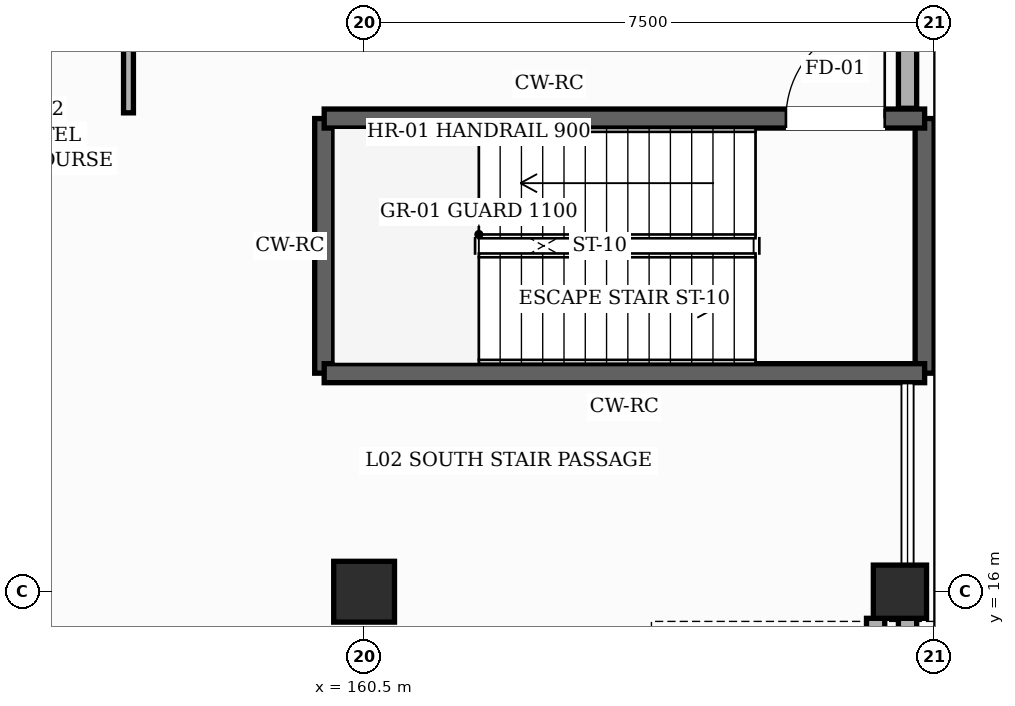
"""IFC4 building model, lengths in metres.
Left out: names, types, materials, properties, quantities, classifications, styles, units other than length and angle.
Written with IfcOpenShell. Run it as: python <this file> out.ifc"""

import sys

from ifc_helpers import new_model, si_unit, direction, frame, frame_2d, origin, origin_2d, place, context, subcontext, project, spatial, rectangle, hollow_rectangle, extrude, element, fill, save


model = new_model("IFC4")
c1 = context("Model", 3, precision=1e-05, world=origin(), true_north=direction((0.0, 1.0)))
c2 = subcontext(c1, "Body", "Model", "MODEL_VIEW")
j1 = project(units=[si_unit("LENGTHUNIT", "METRE"), si_unit("PLANEANGLEUNIT", "RADIAN")], contexts=[c1])
p1 = place(None, origin())
s1 = spatial("IfcSite", under=j1, at=p1, CompositionType="ELEMENT")
p2 = place(p1, origin())
s2 = spatial("IfcBuilding", under=s1, at=p2, CompositionType="ELEMENT")
p3 = place(p2, frame((0.0, 0.0, 10.2)))
s3 = spatial("IfcBuildingStorey", under=s2, at=p3, CompositionType="ELEMENT", Elevation=10.2)
p4 = place(p3, frame((160.5, 16.0, 0.0), z_axis=(0.0, 0.0, 1.0), x_axis=(1.0, 0.0, 0.0)))
e1 = element("IfcColumn", 1, at=p4, inside=s3, PredefinedType="COLUMN", context=c2, shape_type="SweptSolid", body=[
    extrude(hollow_rectangle(XDim=0.8, YDim=0.8, WallThickness=0.032, InnerFilletRadius=0.032, OuterFilletRadius=0.064, at=origin_2d()), origin(), (0.0, 0.0, 1.0), 4.8),
])
p5 = place(p3, frame((167.55, 16.0, 0.0), z_axis=(0.0, 0.0, 1.0), x_axis=(1.0, 0.0, 0.0)))
e2 = element("IfcColumn", 2, at=p5, inside=s3, PredefinedType="COLUMN", context=c2, shape_type="SweptSolid", body=[
    extrude(hollow_rectangle(XDim=0.7, YDim=0.7, WallThickness=0.028, InnerFilletRadius=0.028, OuterFilletRadius=0.056, at=origin_2d()), origin(), (0.0, 0.0, 1.0), 4.8),
])
for number, where, z_axis, x_axis in (
    (3, (167.23, 8.35, 0.0), (0.0, 0.0, 1.0), (0.0, 1.0, 0.0)),
    (4, (167.65, 15.65, 0.0), (0.0, 0.0, 1.0), (0.0, -1.0, 0.0)),
):
    element("IfcWall", number, at=place(p3, frame(where, z_axis=z_axis, x_axis=x_axis)), inside=s3, PredefinedType="SOLIDWALL", context=c2, shape_type="SweptSolid", body=[
        extrude(rectangle(XDim=7.3, YDim=0.24, at=frame_2d((3.65, 0.0))), origin(), (0.0, 0.0, 1.0), 3.885),
    ])
p6 = place(p3, frame((167.65, 23.65, 0.0), z_axis=(0.0, 0.0, 1.0), x_axis=(0.0, -1.0, 0.0)))
e5 = element("IfcWall", 5, at=p6, inside=s3, PredefinedType="SOLIDWALL", context=c2, shape_type="SweptSolid", body=[
    extrude(rectangle(XDim=1.29, YDim=0.24, at=frame_2d((0.645, 0.0))), origin(), (0.0, 0.0, 1.0), 4.545),
])
for number, where, z_axis, x_axis in (
    (6, (167.875, 22.225, 0.0), (0.0, 0.0, 1.0), (0.0, -1.0, 0.0)),
    (7, (159.975, 18.875, 0.0), (0.0, 0.0, 1.0), (0.0, 1.0, 0.0)),
):
    element("IfcWall", number, at=place(p3, frame(where, z_axis=z_axis, x_axis=x_axis)), inside=s3, PredefinedType="SHEAR", context=c2, shape_type="SweptSolid", body=[
        extrude(rectangle(XDim=3.35, YDim=0.25, at=frame_2d((1.675, 0.0))), origin(), (0.0, 0.0, 1.0), 4.56),
    ])
p7 = place(p3, frame((159.975, 22.225, 0.0), z_axis=(0.0, 0.0, 1.0), x_axis=(1.0, 0.0, 0.0)))
e8 = element("IfcWall", 8, at=p7, inside=s3, PredefinedType="SHEAR", context=c2, shape_type="SweptSolid", body=[
    extrude(rectangle(XDim=7.9, YDim=0.25, at=frame_2d((3.95, 0.0))), origin(), (0.0, 0.0, 1.0), 4.56),
])
p8 = place(p7, frame((6.075, 0.0, 0.0)))
e9 = element("IfcOpeningElement", 9, at=p8, cuts=e8, PredefinedType="OPENING", context=c2, shape_type="SweptSolid", body=[
    extrude(rectangle(XDim=1.3, YDim=2.2, at=frame_2d((0.65, 1.1))), frame((0.0, 0.135, 0.0), z_axis=(0.0, -1.0, 0.0), x_axis=(1.0, 0.0, 0.0)), (0.0, 0.0, 1.0), 0.27),
])
p9 = place(p3, frame((167.875, 18.875, 0.0), z_axis=(0.0, 0.0, 1.0), x_axis=(-1.0, 0.0, 0.0)))
e10 = element("IfcWall", 10, at=p9, inside=s3, PredefinedType="SHEAR", context=c2, shape_type="SweptSolid", body=[
    extrude(rectangle(XDim=7.9, YDim=0.25, at=frame_2d((3.95, 0.0))), origin(), (0.0, 0.0, 1.0), 4.56),
])
p10 = place(p3, frame((157.4, 22.3, 0.0), z_axis=(0.0, 0.0, 1.0), x_axis=(0.0, 1.0, 0.0)))
e11 = element("IfcWall", 11, at=p10, inside=s3, PredefinedType="PARTITIONING", context=c2, shape_type="SweptSolid", body=[
    extrude(rectangle(XDim=48.5, YDim=0.13, at=frame_2d((24.25, 0.0))), origin(), (0.0, 0.0, 1.0), 4.545),
])
p11 = place(p10, frame((23.5, 0.0, 0.0)))
e12 = element("IfcOpeningElement", 12, at=p11, cuts=e11, PredefinedType="OPENING", context=c2, shape_type="SweptSolid", body=[
    extrude(rectangle(XDim=1.5, YDim=2.3, at=frame_2d((0.75, 1.15))), frame((0.0, 0.075, 0.0), z_axis=(0.0, -1.0, 0.0), x_axis=(1.0, 0.0, 0.0)), (0.0, 0.0, 1.0), 0.15),
])
p12 = place(p8, origin())
e13 = element("IfcDoor", 13, at=p12, inside=s3, OperationType="SINGLE_SWING_RIGHT", PredefinedType="DOOR", context=c2, shape_type="SweptSolid", body=[
    extrude(rectangle(XDim=1.3, YDim=2.2, at=frame_2d((0.65, 1.1))), frame((0.0, 0.025, 0.0), z_axis=(0.0, -1.0, 0.0), x_axis=(1.0, 0.0, 0.0)), (0.0, 0.0, 1.0), 0.05),
])
fill(e9, e13)
save(model, sys.argv[1])
